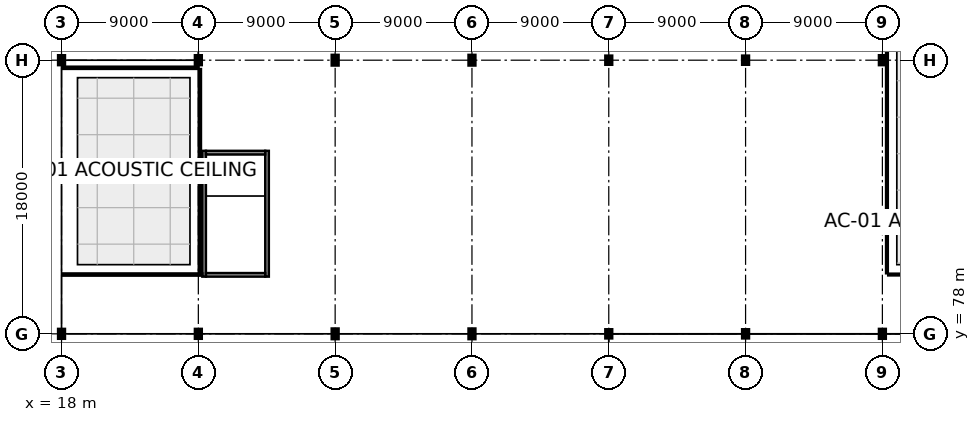
"""IFC4 building model, lengths in metres.
Left out: names, types, materials, properties, quantities, classifications, styles, units other than length and angle.
Written with IfcOpenShell. Run it as: python <this file> out.ifc"""

import sys

from ifc_helpers import new_model, si_unit, direction, frame, frame_2d, origin, origin_2d, place, context, subcontext, project, spatial, rectangle, i_section, extrude, element, fill, save


model = new_model("IFC4")
c1 = context("Model", 3, precision=1e-05, world=origin(), true_north=direction((0.0, 1.0)))
c2 = subcontext(c1, "Body", "Model", "MODEL_VIEW")
j1 = project(units=[si_unit("LENGTHUNIT", "METRE"), si_unit("PLANEANGLEUNIT", "RADIAN")], contexts=[c1])
p1 = place(None, origin())
s1 = spatial("IfcSite", under=j1, at=p1, CompositionType="ELEMENT")
p2 = place(p1, origin())
s2 = spatial("IfcBuilding", under=s1, at=p2, CompositionType="ELEMENT")
p3 = place(p2, frame((0.0, 0.0, 5.4)))
s3 = spatial("IfcBuildingStorey", under=s2, at=p3, CompositionType="ELEMENT", Elevation=5.4)
for number, where, z_axis, x_axis in (
    (1, (18.0, 78.0, 0.0), (0.0, 0.0, 1.0), (0.0, 1.0, 0.0)),
    (2, (18.0, 96.0, 0.0), (0.0, 0.0, 1.0), (1.0, 0.0, 0.0)),
    (3, (27.0, 78.0, 0.0), (0.0, 0.0, 1.0), (1.0, 0.0, 0.0)),
    (4, (27.0, 96.0, 0.0), (0.0, 0.0, 1.0), (1.0, 0.0, 0.0)),
):
    element("IfcColumn", number, at=place(p3, frame(where, z_axis=z_axis, x_axis=x_axis)), inside=s3, PredefinedType="COLUMN", context=c2, shape_type="SweptSolid", body=[
        extrude(i_section(OverallWidth=0.3, OverallDepth=0.5, WebThickness=0.014, FlangeThickness=0.028, at=origin_2d()), origin(), (0.0, 0.0, 1.0), 4.5),
    ])
for number, where, z_axis, x_axis in (
    (5, (36.0, 78.0, 0.0), (0.0, 0.0, 1.0), (1.0, 0.0, 0.0)),
    (6, (36.0, 96.0, 0.0), (0.0, 0.0, 1.0), (0.0, 1.0, 0.0)),
    (7, (45.0, 78.0, 0.0), (0.0, 0.0, 1.0), (1.0, 0.0, 0.0)),
    (8, (45.0, 96.0, 0.0), (0.0, 0.0, 1.0), (1.0, 0.0, 0.0)),
):
    element("IfcColumn", number, at=place(p3, frame(where, z_axis=z_axis, x_axis=x_axis)), inside=s3, PredefinedType="COLUMN", context=c2, shape_type="SweptSolid", body=[
        extrude(i_section(OverallWidth=0.3, OverallDepth=0.55, WebThickness=0.015, FlangeThickness=0.029, at=origin_2d()), origin(), (0.0, 0.0, 1.0), 4.5),
    ])
for number, where, z_axis, x_axis in (
    (9, (54.0, 78.0, 0.0), (0.0, 0.0, 1.0), (1.0, 0.0, 0.0)),
    (10, (54.0, 96.0, 0.0), (0.0, 0.0, 1.0), (1.0, 0.0, 0.0)),
    (11, (63.0, 78.0, 0.0), (0.0, 0.0, 1.0), (0.0, 1.0, 0.0)),
    (12, (63.0, 96.0, 0.0), (0.0, 0.0, 1.0), (1.0, 0.0, 0.0)),
):
    element("IfcColumn", number, at=place(p3, frame(where, z_axis=z_axis, x_axis=x_axis)), inside=s3, PredefinedType="COLUMN", context=c2, shape_type="SweptSolid", body=[
        extrude(i_section(OverallWidth=0.3, OverallDepth=0.45, WebThickness=0.014, FlangeThickness=0.026, at=origin_2d()), origin(), (0.0, 0.0, 1.0), 4.5),
    ])
for number, where, z_axis, x_axis in (
    (13, (72.0, 78.0, 0.0), (0.0, 0.0, 1.0), (1.0, 0.0, 0.0)),
    (14, (72.0, 96.0, 0.0), (0.0, 0.0, 1.0), (1.0, 0.0, 0.0)),
):
    element("IfcColumn", number, at=place(p3, frame(where, z_axis=z_axis, x_axis=x_axis)), inside=s3, PredefinedType="COLUMN", context=c2, shape_type="SweptSolid", body=[
        extrude(i_section(OverallWidth=0.3, OverallDepth=0.5, WebThickness=0.014, FlangeThickness=0.028, at=origin_2d()), origin(), (0.0, 0.0, 1.0), 4.5),
    ])
p4 = place(p3, frame((27.38, 81.76, 0.0), z_axis=(0.0, 0.0, 1.0), x_axis=(0.0, 1.0, 0.0)))
e15 = element("IfcWall", 15, at=p4, inside=s3, PredefinedType="SHEAR", context=c2, shape_type="SweptSolid", body=[
    extrude(rectangle(XDim=8.28, YDim=0.24, at=frame_2d((4.14, 0.0))), origin(), (0.0, 0.0, 1.0), 4.31),
])
p5 = place(p3, frame((31.52, 81.76, 0.0), z_axis=(0.0, 0.0, 1.0), x_axis=(0.0, 1.0, 0.0)))
e16 = element("IfcWall", 16, at=p5, inside=s3, PredefinedType="SHEAR", context=c2, shape_type="SweptSolid", body=[
    extrude(rectangle(XDim=8.28, YDim=0.24, at=frame_2d((4.14, 0.0))), origin(), (0.0, 0.0, 1.0), 4.31),
])
p6 = place(p5, frame((0.49, 0.0, 0.0)))
e17 = element("IfcOpeningElement", 17, at=p6, cuts=e16, PredefinedType="OPENING", context=c2, shape_type="SweptSolid", body=[
    extrude(rectangle(XDim=1.3, YDim=2.2, at=frame_2d((0.65, 1.1))), frame((0.0, 0.135, 0.0), z_axis=(0.0, -1.0, 0.0), x_axis=(1.0, 0.0, 0.0)), (0.0, 0.0, 1.0), 0.27),
])
for number, where, z_axis, x_axis in (
    (18, (27.5, 81.88, 0.0), (0.0, 0.0, 1.0), (1.0, 0.0, 0.0)),
    (19, (27.5, 89.92, 0.0), (0.0, 0.0, 1.0), (1.0, 0.0, 0.0)),
):
    element("IfcWall", number, at=place(p3, frame(where, z_axis=z_axis, x_axis=x_axis)), inside=s3, PredefinedType="SHEAR", context=c2, shape_type="SweptSolid", body=[
        extrude(rectangle(XDim=3.9, YDim=0.24, at=frame_2d((1.95, 0.0))), origin(), (0.0, 0.0, 1.0), 4.31),
    ])
p7 = place(p3, frame((18.075, 95.5, 0.0), z_axis=(0.0, 0.0, 1.0), x_axis=(1.0, 0.0, 0.0)))
e20 = element("IfcWall", 20, at=p7, inside=s3, PredefinedType="PARTITIONING", context=c2, shape_type="SweptSolid", body=[
    extrude(rectangle(XDim=8.945, YDim=0.15, at=frame_2d((4.473, 0.0))), origin(), (0.0, 0.0, 1.0), 4.14),
])
p8 = place(p3, frame((27.1, 95.42, 0.0), z_axis=(0.0, 0.0, 1.0), x_axis=(0.0, -1.0, 0.0)))
e21 = element("IfcWall", 21, at=p8, inside=s3, PredefinedType="PARTITIONING", context=c2, shape_type="SweptSolid", body=[
    extrude(rectangle(XDim=13.44, YDim=0.15, at=frame_2d((6.72, 0.0))), origin(), (0.0, 0.0, 1.0), 3.525),
])
p9 = place(p3, frame((27.265, 81.9, 0.0), z_axis=(0.0, 0.0, 1.0), x_axis=(-1.0, 0.0, 0.0)))
e22 = element("IfcWall", 22, at=p9, inside=s3, PredefinedType="PARTITIONING", context=c2, shape_type="SweptSolid", body=[
    extrude(rectangle(XDim=9.19, YDim=0.15, at=frame_2d((4.595, 0.0))), origin(), (0.0, 0.0, 1.0), 4.14),
])
p10 = place(p9, frame((4.07, 0.0, 0.0)))
e23 = element("IfcOpeningElement", 23, at=p10, cuts=e22, PredefinedType="OPENING", context=c2, shape_type="SweptSolid", body=[
    extrude(rectangle(XDim=1.05, YDim=2.25, at=frame_2d((0.525, 1.125))), frame((0.0, 0.09, 0.0), z_axis=(0.0, -1.0, 0.0), x_axis=(1.0, 0.0, 0.0)), (0.0, 0.0, 1.0), 0.18),
])
p11 = place(p9, frame((6.84, 0.0, 1.05)))
e24 = element("IfcOpeningElement", 24, at=p11, cuts=e22, PredefinedType="OPENING", context=c2, shape_type="SweptSolid", body=[
    extrude(rectangle(XDim=1.5, YDim=1.1, at=frame_2d((0.75, 0.55))), frame((0.0, 0.09, 0.0), z_axis=(0.0, -1.0, 0.0), x_axis=(1.0, 0.0, 0.0)), (0.0, 0.0, 1.0), 0.18),
])
p12 = place(p3, frame((75.92, 81.9, 0.0), z_axis=(0.0, 0.0, 1.0), x_axis=(-1.0, 0.0, 0.0)))
e25 = element("IfcWall", 25, at=p12, inside=s3, PredefinedType="PARTITIONING", context=c2, shape_type="SweptSolid", body=[
    extrude(rectangle(XDim=3.54, YDim=0.12, at=frame_2d((1.77, 0.0))), origin(), (0.0, 0.0, 1.0), 4.14),
])
p13 = place(p12, frame((1.32, 0.0, 0.0)))
e26 = element("IfcOpeningElement", 26, at=p13, cuts=e25, PredefinedType="OPENING", context=c2, shape_type="SweptSolid", body=[
    extrude(rectangle(XDim=0.9, YDim=2.1, at=frame_2d((0.45, 1.05))), frame((0.0, 0.075, 0.0), z_axis=(0.0, -1.0, 0.0), x_axis=(1.0, 0.0, 0.0)), (0.0, 0.0, 1.0), 0.15),
])
p14 = place(p3, frame((72.3, 81.98, 0.0), z_axis=(0.0, 0.0, 1.0), x_axis=(0.0, 1.0, 0.0)))
e27 = element("IfcWall", 27, at=p14, inside=s3, PredefinedType="PARTITIONING", context=c2, shape_type="SweptSolid", body=[
    extrude(rectangle(XDim=25.872, YDim=0.12, at=frame_2d((12.936, 0.0))), origin(), (0.0, 0.0, 1.0), 4.14),
])
p15 = place(p6, frame((1.3, 0.0, 0.0), z_axis=(0.0, 0.0, 1.0), x_axis=(-1.0, 0.0, 0.0)))
e28 = element("IfcDoor", 28, at=p15, inside=s3, OperationType="SINGLE_SWING_RIGHT", PredefinedType="DOOR", context=c2, shape_type="SweptSolid", body=[
    extrude(rectangle(XDim=1.3, YDim=2.2, at=frame_2d((0.65, 1.1))), frame((0.0, 0.025, 0.0), z_axis=(0.0, -1.0, 0.0), x_axis=(1.0, 0.0, 0.0)), (0.0, 0.0, 1.0), 0.05),
])
fill(e17, e28)
p16 = place(p10, origin())
e29 = element("IfcDoor", 29, at=p16, inside=s3, OperationType="SINGLE_SWING_RIGHT", PredefinedType="DOOR", context=c2, shape_type="SweptSolid", body=[
    extrude(rectangle(XDim=1.05, YDim=2.25, at=frame_2d((0.525, 1.125))), frame((0.0, 0.025, 0.0), z_axis=(0.0, -1.0, 0.0), x_axis=(1.0, 0.0, 0.0)), (0.0, 0.0, 1.0), 0.05),
])
fill(e23, e29)
p17 = place(p11, origin())
e30 = element("IfcWindow", 30, at=p17, inside=s3, PartitioningType="SINGLE_PANEL", PredefinedType="WINDOW", context=c2, shape_type="SweptSolid", body=[
    extrude(rectangle(XDim=1.5, YDim=1.1, at=frame_2d((0.75, 0.55))), frame((0.0, 0.03, 0.0), z_axis=(0.0, -1.0, 0.0), x_axis=(1.0, 0.0, 0.0)), (0.0, 0.0, 1.0), 0.06),
])
fill(e24, e30)
save(model, sys.argv[1])
